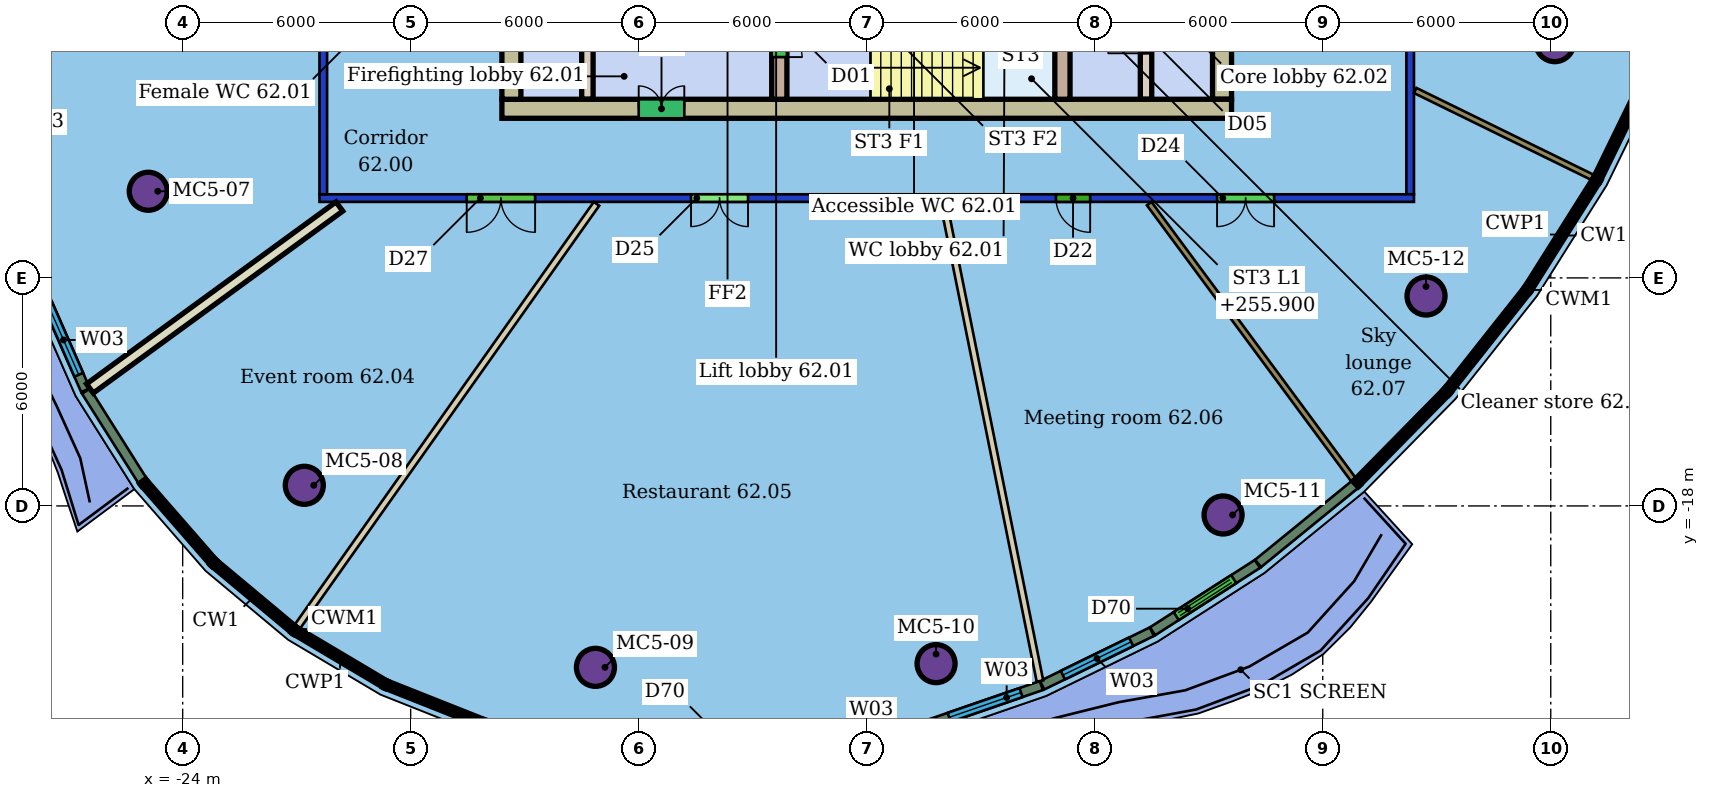
"""IFC4 building model, lengths in metres.
Left out: names, types, materials, properties, quantities, classifications, styles, units other than length and angle.
Written with IfcOpenShell. Run it as: python <this file> out.ifc"""

import sys

from ifc_helpers import new_model, si_unit, direction, frame, frame_2d, origin, origin_2d, place, context, subcontext, project, spatial, rectangle, hollow_circle, extrude, element, fill, save


model = new_model("IFC4")
c1 = context("Model", 3, precision=1e-05, world=origin(), true_north=direction((0.0, 1.0)))
c2 = subcontext(c1, "Body", "Model", "MODEL_VIEW")
j1 = project(units=[si_unit("LENGTHUNIT", "METRE"), si_unit("PLANEANGLEUNIT", "RADIAN")], contexts=[c1])
p1 = place(None, origin())
s1 = spatial("IfcSite", under=j1, at=p1, CompositionType="ELEMENT")
p2 = place(p1, origin())
s2 = spatial("IfcBuilding", under=s1, at=p2, CompositionType="ELEMENT")
p3 = place(p2, frame((0.0, 0.0, 254.1)))
s3 = spatial("IfcBuildingStorey", under=s2, at=p3, CompositionType="ELEMENT", Elevation=254.1)
for number, where, z_axis, x_axis in (
    (1, (-24.906, -9.72, 0.0), (0.0, 0.0, 1.0), (1.0, 0.0, 0.0)),
    (2, (-20.8, -17.457, 0.0), (0.0, 0.0, 1.0), (1.0, 0.0, 0.0)),
    (3, (-13.138, -22.247, 0.0), (0.0, 0.0, 1.0), (1.0, 0.0, 0.0)),
    (4, (-4.175, -22.149, 0.0), (0.0, 0.0, 1.0), (1.0, 0.0, 0.0)),
    (5, (3.377, -18.238, 0.0), (0.0, 0.0, 1.0), (1.0, 0.0, 0.0)),
    (6, (8.718, -12.477, 0.0), (0.0, 0.0, 1.0), (1.0, 0.0, 0.0)),
    (7, (12.106, -5.81, 0.0), (0.0, 0.0, 1.0), (1.0, 0.0, 0.0)),
):
    element("IfcColumn", number, at=place(p3, frame(where, z_axis=z_axis, x_axis=x_axis)), inside=s3, PredefinedType="COLUMN", context=c2, shape_type="SweptSolid", body=[
        extrude(hollow_circle(Radius=0.5, WallThickness=0.04, at=origin_2d()), origin(), (0.0, 0.0, 1.0), 3.45),
    ])
p4 = place(p3, frame((8.4, -9.9, 0.0), z_axis=(0.0, 0.0, 1.0), x_axis=(-1.0, 0.0, 0.0)))
e8 = element("IfcWall", 8, at=p4, inside=s3, PredefinedType="PARTITIONING", context=c2, shape_type="SweptSolid", body=[
    extrude(rectangle(XDim=28.8, YDim=0.2, at=frame_2d((14.4, 0.0))), origin(), (0.0, 0.0, 1.0), 3.1),
])
p5 = place(p4, frame((23.126, 0.0, 0.0)))
e9 = element("IfcOpeningElement", 9, at=p5, cuts=e8, PredefinedType="OPENING", context=c2, shape_type="SweptSolid", body=[
    extrude(rectangle(XDim=1.8, YDim=2.4, at=frame_2d((0.9, 1.2))), frame((0.0, 0.11, 0.0), z_axis=(0.0, -1.0, 0.0), x_axis=(1.0, 0.0, 0.0)), (0.0, 0.0, 1.0), 0.22),
])
p6 = place(p4, frame((17.523, 0.0, 0.0)))
e10 = element("IfcOpeningElement", 10, at=p6, cuts=e8, PredefinedType="OPENING", context=c2, shape_type="SweptSolid", body=[
    extrude(rectangle(XDim=1.5, YDim=2.4, at=frame_2d((0.75, 1.2))), frame((0.0, 0.11, 0.0), z_axis=(0.0, -1.0, 0.0), x_axis=(1.0, 0.0, 0.0)), (0.0, 0.0, 1.0), 0.22),
])
p7 = place(p4, frame((8.52, 0.0, 0.0)))
e11 = element("IfcOpeningElement", 11, at=p7, cuts=e8, PredefinedType="OPENING", context=c2, shape_type="SweptSolid", body=[
    extrude(rectangle(XDim=0.9, YDim=2.1, at=frame_2d((0.45, 1.05))), frame((0.0, 0.11, 0.0), z_axis=(0.0, -1.0, 0.0), x_axis=(1.0, 0.0, 0.0)), (0.0, 0.0, 1.0), 0.22),
])
p8 = place(p4, frame((3.68, 0.0, 0.0)))
e12 = element("IfcOpeningElement", 12, at=p8, cuts=e8, PredefinedType="OPENING", context=c2, shape_type="SweptSolid", body=[
    extrude(rectangle(XDim=1.5, YDim=2.1, at=frame_2d((0.75, 1.05))), frame((0.0, 0.11, 0.0), z_axis=(0.0, -1.0, 0.0), x_axis=(1.0, 0.0, 0.0)), (0.0, 0.0, 1.0), 0.22),
])
p9 = place(p3, frame((-20.3, -9.8, 0.0), z_axis=(0.0, 0.0, 1.0), x_axis=(0.0, 1.0, 0.0)))
e13 = element("IfcWall", 13, at=p9, inside=s3, PredefinedType="PARTITIONING", context=c2, shape_type="SweptSolid", body=[
    extrude(rectangle(XDim=19.6, YDim=0.2, at=frame_2d((9.8, 0.0))), origin(), (0.0, 0.0, 1.0), 3.1),
])
p10 = place(p9, frame((14.022, 0.0, 0.0)))
e14 = element("IfcOpeningElement", 14, at=p10, cuts=e13, PredefinedType="OPENING", context=c2, shape_type="SweptSolid", body=[
    extrude(rectangle(XDim=1.5, YDim=2.1, at=frame_2d((0.75, 1.05))), frame((0.0, 0.11, 0.0), z_axis=(0.0, -1.0, 0.0), x_axis=(1.0, 0.0, 0.0)), (0.0, 0.0, 1.0), 0.22),
])
p11 = place(p9, frame((6.812, 0.0, 0.0)))
e15 = element("IfcOpeningElement", 15, at=p11, cuts=e13, PredefinedType="OPENING", context=c2, shape_type="SweptSolid", body=[
    extrude(rectangle(XDim=1.8, YDim=2.4, at=frame_2d((0.9, 1.2))), frame((0.0, 0.11, 0.0), z_axis=(0.0, -1.0, 0.0), x_axis=(1.0, 0.0, 0.0)), (0.0, 0.0, 1.0), 0.22),
])
p12 = place(p3, frame((8.3, 9.8, 0.0), z_axis=(0.0, 0.0, 1.0), x_axis=(0.0, -1.0, 0.0)))
e16 = element("IfcWall", 16, at=p12, inside=s3, PredefinedType="PARTITIONING", context=c2, shape_type="SweptSolid", body=[
    extrude(rectangle(XDim=19.6, YDim=0.2, at=frame_2d((9.8, 0.0))), origin(), (0.0, 0.0, 1.0), 3.1),
])
p13 = place(p12, frame((10.302, 0.0, 0.0)))
e17 = element("IfcOpeningElement", 17, at=p13, cuts=e16, PredefinedType="OPENING", context=c2, shape_type="SweptSolid", body=[
    extrude(rectangle(XDim=1.8, YDim=2.1, at=frame_2d((0.9, 1.05))), frame((0.0, 0.11, 0.0), z_axis=(0.0, -1.0, 0.0), x_axis=(1.0, 0.0, 0.0)), (0.0, 0.0, 1.0), 0.22),
])
p14 = place(p3, frame((-26.44, -14.909, 0.0), z_axis=(0.0, 0.0, 1.0), x_axis=(0.807908876314, 0.589307430441, 0.0)))
e18 = element("IfcWall", 18, at=p14, inside=s3, PredefinedType="PARTITIONING", context=c2, shape_type="SweptSolid", body=[
    extrude(rectangle(XDim=8.125, YDim=0.3, at=frame_2d((4.062, 0.0))), origin(), (0.0, 0.0, 1.0), 3.45),
])
p15 = place(p3, frame((-20.981, -21.174, 0.0), z_axis=(0.0, 0.0, 1.0), x_axis=(0.577574818001, 0.816337754615, 0.0)))
e19 = element("IfcWall", 19, at=p15, inside=s3, PredefinedType="PARTITIONING", context=c2, shape_type="SweptSolid", body=[
    extrude(rectangle(XDim=13.626, YDim=0.175, at=frame_2d((6.813, 0.0))), origin(), (0.0, 0.0, 1.0), 3.45),
])
p16 = place(p3, frame((-1.441, -22.607, 0.0), z_axis=(0.0, 0.0, 1.0), x_axis=(-0.197654886064, 0.980271669495, 0.0)))
e20 = element("IfcWall", 20, at=p16, inside=s3, PredefinedType="PARTITIONING", context=c2, shape_type="SweptSolid", body=[
    extrude(rectangle(XDim=12.844, YDim=0.175, at=frame_2d((6.422, 0.0))), origin(), (0.0, 0.0, 1.0), 3.45),
])
p17 = place(p3, frame((6.807, -17.308, 0.0), z_axis=(0.0, 0.0, 1.0), x_axis=(-0.594825545765, 0.803854819047, 0.0)))
e21 = element("IfcWall", 21, at=p17, inside=s3, PredefinedType="PARTITIONING", context=c2, shape_type="SweptSolid", body=[
    extrude(rectangle(XDim=9.035, YDim=0.15, at=frame_2d((4.518, 0.0))), origin(), (0.0, 0.0, 1.0), 3.45),
])
p18 = place(p3, frame((13.101, -9.354, 0.0), z_axis=(0.0, 0.0, 1.0), x_axis=(-0.898079749188, 0.439832654652, 0.0)))
e22 = element("IfcWall", 22, at=p18, inside=s3, PredefinedType="PARTITIONING", context=c2, shape_type="SweptSolid", body=[
    extrude(rectangle(XDim=5.197, YDim=0.15, at=frame_2d((2.599, 0.0))), origin(), (0.0, 0.0, 1.0), 3.45),
])
p19 = place(p3, frame((-27.716, -12.311, 0.0), z_axis=(0.0, 0.0, 1.0), x_axis=(0.401639105758, -0.915798028348, 0.0)))
e23 = element("IfcWall", 23, at=p19, inside=s3, PredefinedType="SOLIDWALL", context=c2, shape_type="SweptSolid", body=[
    extrude(rectangle(XDim=2.888, YDim=0.25, at=frame_2d((1.444, 0.0))), origin(), (0.0, 0.0, 1.0), 3.15),
])
p20 = place(p19, frame((0.444, 0.0, 0.9)))
e24 = element("IfcOpeningElement", 24, at=p20, cuts=e23, PredefinedType="OPENING", context=c2, shape_type="SweptSolid", body=[
    extrude(rectangle(XDim=2.0, YDim=2.1, at=frame_2d((1.0, 1.05))), frame((0.0, 0.135, 0.0), z_axis=(0.0, -1.0, 0.0), x_axis=(1.0, 0.0, 0.0)), (0.0, 0.0, 1.0), 0.27),
])
p21 = place(p3, frame((-26.544, -14.979, 0.0), z_axis=(0.0, 0.0, 1.0), x_axis=(0.533094811272, -0.846055507751, 0.0)))
e25 = element("IfcWall", 25, at=p21, inside=s3, PredefinedType="SOLIDWALL", context=c2, shape_type="SweptSolid", body=[
    extrude(rectangle(XDim=2.783, YDim=0.25, at=frame_2d((1.391, 0.0))), origin(), (0.0, 0.0, 1.0), 3.15),
])
p22 = place(p3, frame((-4.365, -23.747, 0.0), z_axis=(0.0, 0.0, 1.0), x_axis=(0.945414397725, 0.325870551867, 0.0)))
e26 = element("IfcWall", 26, at=p22, inside=s3, PredefinedType="SOLIDWALL", context=c2, shape_type="SweptSolid", body=[
    extrude(rectangle(XDim=3.132, YDim=0.25, at=frame_2d((1.566, 0.0))), origin(), (0.0, 0.0, 1.0), 3.15),
])
p23 = place(p22, frame((0.566, 0.0, 0.9)))
e27 = element("IfcOpeningElement", 27, at=p23, cuts=e26, PredefinedType="OPENING", context=c2, shape_type="SweptSolid", body=[
    extrude(rectangle(XDim=2.0, YDim=2.1, at=frame_2d((1.0, 1.05))), frame((0.0, 0.135, 0.0), z_axis=(0.0, -1.0, 0.0), x_axis=(1.0, 0.0, 0.0)), (0.0, 0.0, 1.0), 0.27),
])
p24 = place(p3, frame((-1.383, -22.718, 0.0), z_axis=(0.0, 0.0, 1.0), x_axis=(0.898675594267, 0.438613926214, 0.0)))
e28 = element("IfcWall", 28, at=p24, inside=s3, PredefinedType="SOLIDWALL", context=c2, shape_type="SweptSolid", body=[
    extrude(rectangle(XDim=3.21, YDim=0.25, at=frame_2d((1.605, 0.0))), origin(), (0.0, 0.0, 1.0), 3.15),
])
p25 = place(p24, frame((0.605, 0.0, 0.9)))
e29 = element("IfcOpeningElement", 29, at=p25, cuts=e28, PredefinedType="OPENING", context=c2, shape_type="SweptSolid", body=[
    extrude(rectangle(XDim=2.0, YDim=2.1, at=frame_2d((1.0, 1.05))), frame((0.0, 0.135, 0.0), z_axis=(0.0, -1.0, 0.0), x_axis=(1.0, 0.0, 0.0)), (0.0, 0.0, 1.0), 0.27),
])
p26 = place(p3, frame((1.522, -21.299, 0.0), z_axis=(0.0, 0.0, 1.0), x_axis=(0.841357447224, 0.540479089328, 0.0)))
e30 = element("IfcWall", 30, at=p26, inside=s3, PredefinedType="SOLIDWALL", context=c2, shape_type="SweptSolid", body=[
    extrude(rectangle(XDim=3.279, YDim=0.25, at=frame_2d((1.64, 0.0))), origin(), (0.0, 0.0, 1.0), 3.15),
])
p27 = place(p26, frame((0.74, 0.0, 0.0)))
e31 = element("IfcOpeningElement", 31, at=p27, cuts=e30, PredefinedType="OPENING", context=c2, shape_type="SweptSolid", body=[
    extrude(rectangle(XDim=1.8, YDim=2.4, at=frame_2d((0.9, 1.2))), frame((0.0, 0.135, 0.0), z_axis=(0.0, -1.0, 0.0), x_axis=(1.0, 0.0, 0.0)), (0.0, 0.0, 1.0), 0.27),
])
p28 = place(p3, frame((4.298, -19.513, 0.0), z_axis=(0.0, 0.0, 1.0), x_axis=(0.775212105866, 0.631701029696, 0.0)))
e32 = element("IfcWall", 32, at=p28, inside=s3, PredefinedType="SOLIDWALL", context=c2, shape_type="SweptSolid", body=[
    extrude(rectangle(XDim=3.29, YDim=0.25, at=frame_2d((1.645, 0.0))), origin(), (0.0, 0.0, 1.0), 3.15),
])
p29 = place(p3, frame((-15.6, -7.55, 0.0), z_axis=(0.0, 0.0, 1.0), x_axis=(1.0, 0.0, 0.0)))
e33 = element("IfcWall", 33, at=p29, inside=s3, PredefinedType="SHEAR", context=c2, shape_type="SweptSolid", body=[
    extrude(rectangle(XDim=19.2, YDim=0.5, at=frame_2d((9.6, 0.0))), origin(), (0.0, 0.0, 1.0), 3.3),
])
p30 = place(p29, frame((3.6, 0.0, 0.0)))
e34 = element("IfcOpeningElement", 34, at=p30, cuts=e33, PredefinedType="OPENING", context=c2, shape_type="SweptSolid", body=[
    extrude(rectangle(XDim=1.2, YDim=2.1, at=frame_2d((0.6, 1.05))), frame((0.0, 0.26, 0.0), z_axis=(0.0, -1.0, 0.0), x_axis=(1.0, 0.0, 0.0)), (0.0, 0.0, 1.0), 0.52),
])
p31 = place(p3, frame((-15.35, 7.3, 0.0), z_axis=(0.0, 0.0, 1.0), x_axis=(0.0, -1.0, 0.0)))
e35 = element("IfcWall", 35, at=p31, inside=s3, PredefinedType="SHEAR", context=c2, shape_type="SweptSolid", body=[
    extrude(rectangle(XDim=14.6, YDim=0.5, at=frame_2d((7.3, 0.0))), origin(), (0.0, 0.0, 1.0), 3.3),
])
p32 = place(p31, frame((10.6, 0.0, 0.0)))
e36 = element("IfcOpeningElement", 36, at=p32, cuts=e35, PredefinedType="OPENING", context=c2, shape_type="SweptSolid", body=[
    extrude(rectangle(XDim=1.2, YDim=2.1, at=frame_2d((0.6, 1.05))), frame((0.0, 0.26, 0.0), z_axis=(0.0, -1.0, 0.0), x_axis=(1.0, 0.0, 0.0)), (0.0, 0.0, 1.0), 0.52),
])
p33 = place(p31, frame((2.8, 0.0, 0.0)))
e37 = element("IfcOpeningElement", 37, at=p33, cuts=e35, PredefinedType="OPENING", context=c2, shape_type="SweptSolid", body=[
    extrude(rectangle(XDim=1.2, YDim=2.1, at=frame_2d((0.6, 1.05))), frame((0.0, 0.26, 0.0), z_axis=(0.0, -1.0, 0.0), x_axis=(1.0, 0.0, 0.0)), (0.0, 0.0, 1.0), 0.52),
])
p34 = place(p3, frame((3.35, -7.3, 0.0), z_axis=(0.0, 0.0, 1.0), x_axis=(0.0, 1.0, 0.0)))
e38 = element("IfcWall", 38, at=p34, inside=s3, PredefinedType="SHEAR", context=c2, shape_type="SweptSolid", body=[
    extrude(rectangle(XDim=14.6, YDim=0.5, at=frame_2d((7.3, 0.0))), origin(), (0.0, 0.0, 1.0), 3.3),
])
p35 = place(p34, frame((2.8, 0.0, 0.0)))
e39 = element("IfcOpeningElement", 39, at=p35, cuts=e38, PredefinedType="OPENING", context=c2, shape_type="SweptSolid", body=[
    extrude(rectangle(XDim=1.2, YDim=2.1, at=frame_2d((0.6, 1.05))), frame((0.0, 0.26, 0.0), z_axis=(0.0, -1.0, 0.0), x_axis=(1.0, 0.0, 0.0)), (0.0, 0.0, 1.0), 0.52),
])
p36 = place(p34, frame((10.6, 0.0, 0.0)))
e40 = element("IfcOpeningElement", 40, at=p36, cuts=e38, PredefinedType="OPENING", context=c2, shape_type="SweptSolid", body=[
    extrude(rectangle(XDim=1.2, YDim=2.1, at=frame_2d((0.6, 1.05))), frame((0.0, 0.26, 0.0), z_axis=(0.0, -1.0, 0.0), x_axis=(1.0, 0.0, 0.0)), (0.0, 0.0, 1.0), 0.52),
])
p37 = place(p3, frame((-13.35, 7.3, 0.0), z_axis=(0.0, 0.0, 1.0), x_axis=(0.0, -1.0, 0.0)))
e41 = element("IfcWall", 41, at=p37, inside=s3, PredefinedType="SHEAR", context=c2, shape_type="SweptSolid", body=[
    extrude(rectangle(XDim=14.6, YDim=0.3, at=frame_2d((7.3, 0.0))), origin(), (0.0, 0.0, 1.0), 3.3),
])
p38 = place(p37, frame((6.55, 0.0, 0.0)))
e42 = element("IfcOpeningElement", 42, at=p38, cuts=e41, PredefinedType="OPENING", context=c2, shape_type="SweptSolid", body=[
    extrude(rectangle(XDim=1.5, YDim=2.1, at=frame_2d((0.75, 1.05))), frame((0.0, 0.16, 0.0), z_axis=(0.0, -1.0, 0.0), x_axis=(1.0, 0.0, 0.0)), (0.0, 0.0, 1.0), 0.32),
])
p39 = place(p3, frame((1.35, -7.3, 0.0), z_axis=(0.0, 0.0, 1.0), x_axis=(0.0, 1.0, 0.0)))
e43 = element("IfcWall", 43, at=p39, inside=s3, PredefinedType="SHEAR", context=c2, shape_type="SweptSolid", body=[
    extrude(rectangle(XDim=14.6, YDim=0.3, at=frame_2d((7.3, 0.0))), origin(), (0.0, 0.0, 1.0), 3.3),
])
p40 = place(p39, frame((1.21, 0.0, 0.0)))
e44 = element("IfcOpeningElement", 44, at=p40, cuts=e43, PredefinedType="OPENING", context=c2, shape_type="SweptSolid", body=[
    extrude(rectangle(XDim=1.0, YDim=2.1, at=frame_2d((0.5, 1.05))), frame((0.0, 0.16, 0.0), z_axis=(0.0, -1.0, 0.0), x_axis=(1.0, 0.0, 0.0)), (0.0, 0.0, 1.0), 0.32),
])
p41 = place(p39, frame((6.55, 0.0, 0.0)))
e45 = element("IfcOpeningElement", 45, at=p41, cuts=e43, PredefinedType="OPENING", context=c2, shape_type="SweptSolid", body=[
    extrude(rectangle(XDim=1.5, YDim=2.1, at=frame_2d((0.75, 1.05))), frame((0.0, 0.16, 0.0), z_axis=(0.0, -1.0, 0.0), x_axis=(1.0, 0.0, 0.0)), (0.0, 0.0, 1.0), 0.32),
])
p42 = place(p3, frame((-8.3, -3.88, 0.0), z_axis=(0.0, 0.0, 1.0), x_axis=(0.0, -1.0, 0.0)))
e46 = element("IfcWall", 46, at=p42, inside=s3, PredefinedType="SHEAR", context=c2, shape_type="SweptSolid", body=[
    extrude(rectangle(XDim=3.42, YDim=0.4, at=frame_2d((1.71, 0.0))), origin(), (0.0, 0.0, 1.0), 3.3),
])
p43 = place(p42, frame((1.11, 0.0, 0.0)))
e47 = element("IfcOpeningElement", 47, at=p43, cuts=e46, PredefinedType="OPENING", context=c2, shape_type="SweptSolid", body=[
    extrude(rectangle(XDim=1.2, YDim=2.1, at=frame_2d((0.6, 1.05))), frame((0.0, 0.21, 0.0), z_axis=(0.0, -1.0, 0.0), x_axis=(1.0, 0.0, 0.0)), (0.0, 0.0, 1.0), 0.42),
])
p44 = place(p3, frame((-0.85, -3.88, 0.0), z_axis=(0.0, 0.0, 1.0), x_axis=(0.0, -1.0, 0.0)))
e48 = element("IfcWall", 48, at=p44, inside=s3, PredefinedType="SHEAR", context=c2, shape_type="SweptSolid", body=[
    extrude(rectangle(XDim=3.42, YDim=0.4, at=frame_2d((1.71, 0.0))), origin(), (0.0, 0.0, 1.0), 3.3),
])
p45 = place(p5, origin())
e49 = element("IfcDoor", 49, at=p45, inside=s3, OperationType="DOUBLE_DOOR_SINGLE_SWING", PredefinedType="DOOR", context=c2, shape_type="SweptSolid", body=[
    extrude(rectangle(XDim=1.8, YDim=2.4, at=frame_2d((0.9, 1.2))), frame((0.0, 0.025, 0.0), z_axis=(0.0, -1.0, 0.0), x_axis=(1.0, 0.0, 0.0)), (0.0, 0.0, 1.0), 0.05),
])
fill(e9, e49)
p46 = place(p6, origin())
e50 = element("IfcDoor", 50, at=p46, inside=s3, OperationType="DOUBLE_DOOR_SINGLE_SWING", PredefinedType="DOOR", context=c2, shape_type="SweptSolid", body=[
    extrude(rectangle(XDim=1.5, YDim=2.4, at=frame_2d((0.75, 1.2))), frame((0.0, 0.025, 0.0), z_axis=(0.0, -1.0, 0.0), x_axis=(1.0, 0.0, 0.0)), (0.0, 0.0, 1.0), 0.05),
])
fill(e10, e50)
p47 = place(p7, origin())
e51 = element("IfcDoor", 51, at=p47, inside=s3, OperationType="SINGLE_SWING_LEFT", PredefinedType="DOOR", context=c2, shape_type="SweptSolid", body=[
    extrude(rectangle(XDim=0.9, YDim=2.1, at=frame_2d((0.45, 1.05))), frame((0.0, 0.025, 0.0), z_axis=(0.0, -1.0, 0.0), x_axis=(1.0, 0.0, 0.0)), (0.0, 0.0, 1.0), 0.05),
])
fill(e11, e51)
p48 = place(p8, origin())
e52 = element("IfcDoor", 52, at=p48, inside=s3, OperationType="DOUBLE_DOOR_SINGLE_SWING", PredefinedType="DOOR", context=c2, shape_type="SweptSolid", body=[
    extrude(rectangle(XDim=1.5, YDim=2.1, at=frame_2d((0.75, 1.05))), frame((0.0, 0.025, 0.0), z_axis=(0.0, -1.0, 0.0), x_axis=(1.0, 0.0, 0.0)), (0.0, 0.0, 1.0), 0.05),
])
fill(e12, e52)
p49 = place(p20, origin())
e53 = element("IfcWindow", 53, at=p49, inside=s3, PartitioningType="SINGLE_PANEL", PredefinedType="WINDOW", context=c2, shape_type="SweptSolid", body=[
    extrude(rectangle(XDim=2.0, YDim=2.1, at=frame_2d((1.0, 1.05))), frame((0.0, 0.03, 0.0), z_axis=(0.0, -1.0, 0.0), x_axis=(1.0, 0.0, 0.0)), (0.0, 0.0, 1.0), 0.06),
])
fill(e24, e53)
p50 = place(p23, origin())
e54 = element("IfcWindow", 54, at=p50, inside=s3, PartitioningType="SINGLE_PANEL", PredefinedType="WINDOW", context=c2, shape_type="SweptSolid", body=[
    extrude(rectangle(XDim=2.0, YDim=2.1, at=frame_2d((1.0, 1.05))), frame((0.0, 0.03, 0.0), z_axis=(0.0, -1.0, 0.0), x_axis=(1.0, 0.0, 0.0)), (0.0, 0.0, 1.0), 0.06),
])
fill(e27, e54)
p51 = place(p25, origin())
e55 = element("IfcWindow", 55, at=p51, inside=s3, PartitioningType="SINGLE_PANEL", PredefinedType="WINDOW", context=c2, shape_type="SweptSolid", body=[
    extrude(rectangle(XDim=2.0, YDim=2.1, at=frame_2d((1.0, 1.05))), frame((0.0, 0.03, 0.0), z_axis=(0.0, -1.0, 0.0), x_axis=(1.0, 0.0, 0.0)), (0.0, 0.0, 1.0), 0.06),
])
fill(e29, e55)
p52 = place(p27, origin())
e56 = element("IfcDoor", 56, at=p52, inside=s3, OperationType="DOUBLE_DOOR_SLIDING", PredefinedType="DOOR", context=c2, shape_type="SweptSolid", body=[
    extrude(rectangle(XDim=1.8, YDim=2.4, at=frame_2d((0.9, 1.2))), frame((0.0, 0.025, 0.0), z_axis=(0.0, -1.0, 0.0), x_axis=(1.0, 0.0, 0.0)), (0.0, 0.0, 1.0), 0.05),
])
fill(e31, e56)
p53 = place(p30, origin())
e57 = element("IfcDoor", 57, at=p53, inside=s3, OperationType="DOUBLE_DOOR_SINGLE_SWING", PredefinedType="NOTDEFINED", context=c2, shape_type="SweptSolid", body=[
    extrude(rectangle(XDim=1.2, YDim=2.1, at=frame_2d((0.6, 1.05))), frame((0.0, 0.025, 0.0), z_axis=(0.0, -1.0, 0.0), x_axis=(1.0, 0.0, 0.0)), (0.0, 0.0, 1.0), 0.05),
])
fill(e34, e57)
p54 = place(p40, origin())
e58 = element("IfcDoor", 58, at=p54, inside=s3, OperationType="SINGLE_SWING_LEFT", PredefinedType="NOTDEFINED", context=c2, shape_type="SweptSolid", body=[
    extrude(rectangle(XDim=1.0, YDim=2.1, at=frame_2d((0.5, 1.05))), frame((0.0, 0.025, 0.0), z_axis=(0.0, -1.0, 0.0), x_axis=(1.0, 0.0, 0.0)), (0.0, 0.0, 1.0), 0.05),
])
fill(e44, e58)
p55 = place(p43, origin())
e59 = element("IfcDoor", 59, at=p55, inside=s3, OperationType="DOUBLE_DOOR_SINGLE_SWING", PredefinedType="NOTDEFINED", context=c2, shape_type="SweptSolid", body=[
    extrude(rectangle(XDim=1.2, YDim=2.1, at=frame_2d((0.6, 1.05))), frame((0.0, 0.025, 0.0), z_axis=(0.0, -1.0, 0.0), x_axis=(1.0, 0.0, 0.0)), (0.0, 0.0, 1.0), 0.05),
])
fill(e47, e59)
save(model, sys.argv[1])
